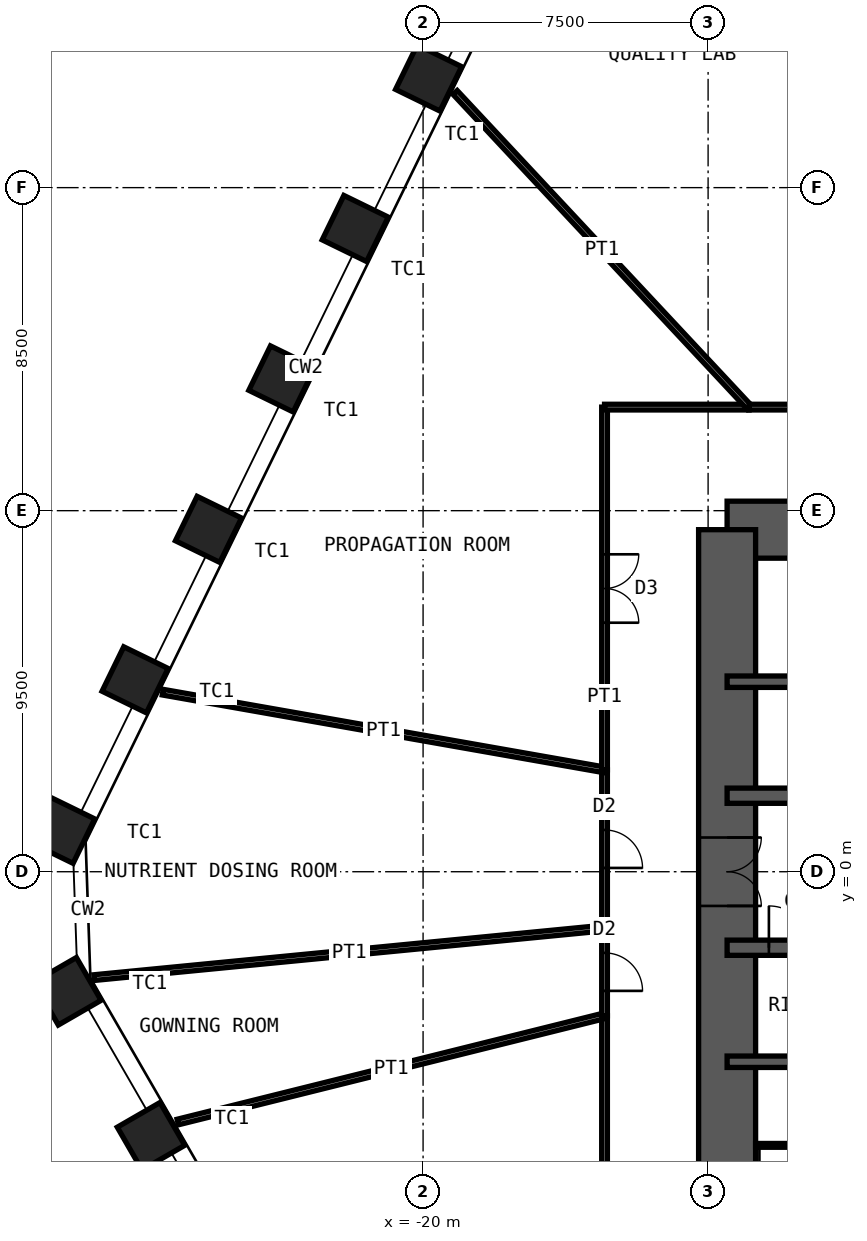
"""IFC4 building model, lengths in metres.
Left out: names, types, materials, properties, quantities, classifications, styles, units other than length and angle.
Written with IfcOpenShell. Run it as: python <this file> out.ifc"""

import sys

from ifc_helpers import new_model, si_unit, direction, frame, frame_2d, origin, origin_2d, place, context, subcontext, project, spatial, rectangle, hollow_rectangle, extrude, element, fill, save


model = new_model("IFC4")
c1 = context("Model", 3, precision=1e-05, world=origin(), true_north=direction((0.0, 1.0)))
c2 = subcontext(c1, "Body", "Model", "MODEL_VIEW")
j1 = project(units=[si_unit("LENGTHUNIT", "METRE"), si_unit("PLANEANGLEUNIT", "RADIAN")], contexts=[c1])
p1 = place(None, origin())
s1 = spatial("IfcSite", under=j1, at=p1, CompositionType="ELEMENT")
p2 = place(p1, origin())
s2 = spatial("IfcBuilding", under=s1, at=p2, CompositionType="ELEMENT")
p3 = place(p2, frame((0.0, 0.0, 32.0)))
s3 = spatial("IfcBuildingStorey", under=s2, at=p3, CompositionType="ELEMENT", Elevation=32.0)
for number, where, z_axis, x_axis in (
    (1, (-27.158, -6.96, 0.0), (0.0, 0.0, 1.0), (0.5, -0.866, 0.0)),
    (2, (-29.361, -3.146, 0.0), (0.0, 0.0, 1.0), (0.5, -0.866, 0.0)),
    (3, (-29.509, 1.09, 0.0), (0.0, 0.0, 1.0), (-0.438, -0.899, 0.0)),
    (4, (-27.578, 5.049, 0.0), (0.0, 0.0, 1.0), (-0.438, -0.899, 0.0)),
    (5, (-25.647, 9.008, 0.0), (0.0, 0.0, 1.0), (-0.438, -0.899, 0.0)),
    (6, (-23.716, 12.966, 0.0), (0.0, 0.0, 1.0), (-0.438, -0.899, 0.0)),
    (7, (-21.785, 16.925, 0.0), (0.0, 0.0, 1.0), (-0.438, -0.899, 0.0)),
    (8, (-19.854, 20.884, 0.0), (0.0, 0.0, 1.0), (-0.438, -0.899, 0.0)),
):
    element("IfcColumn", number, at=place(p3, frame(where, z_axis=z_axis, x_axis=x_axis)), inside=s3, PredefinedType="COLUMN", context=c2, shape_type="SweptSolid", body=[
        extrude(hollow_rectangle(XDim=1.3, YDim=1.3, WallThickness=0.1, at=origin_2d()), origin(), (0.0, 0.0, 1.0), 5.0),
    ])
p4 = place(p3, frame((-12.0, 9.0, 0.0), z_axis=(0.0, 0.0, 1.0), x_axis=(1.0, 0.0, 0.0)))
e9 = element("IfcWall", 9, at=p4, inside=s3, PredefinedType="SHEAR", context=c2, shape_type="SweptSolid", body=[
    extrude(rectangle(XDim=24.0, YDim=1.5, at=frame_2d((12.0, 0.0))), origin(), (0.0, 0.0, 1.0), 5.0),
])
p5 = place(p4, frame((10.4, 0.0, 0.0)))
e10 = element("IfcOpeningElement", 10, at=p5, cuts=e9, PredefinedType="OPENING", context=c2, shape_type="SweptSolid", body=[
    extrude(rectangle(XDim=1.0, YDim=2.1, at=frame_2d((0.5, 1.05))), frame((0.0, 0.76, 0.0), z_axis=(0.0, -1.0, 0.0), x_axis=(1.0, 0.0, 0.0)), (0.0, 0.0, 1.0), 1.52),
])
p6 = place(p4, frame((17.6, 0.0, 0.0)))
e11 = element("IfcOpeningElement", 11, at=p6, cuts=e9, PredefinedType="OPENING", context=c2, shape_type="SweptSolid", body=[
    extrude(rectangle(XDim=0.9, YDim=2.1, at=frame_2d((0.45, 1.05))), frame((0.0, 0.76, 0.0), z_axis=(0.0, -1.0, 0.0), x_axis=(1.0, 0.0, 0.0)), (0.0, 0.0, 1.0), 1.52),
])
p7 = place(p4, frame((21.9, 0.0, 0.0)))
e12 = element("IfcOpeningElement", 12, at=p7, cuts=e9, PredefinedType="OPENING", context=c2, shape_type="SweptSolid", body=[
    extrude(rectangle(XDim=0.9, YDim=2.1, at=frame_2d((0.45, 1.05))), frame((0.0, 0.76, 0.0), z_axis=(0.0, -1.0, 0.0), x_axis=(1.0, 0.0, 0.0)), (0.0, 0.0, 1.0), 1.52),
])
p8 = place(p3, frame((-12.0, -9.0, 0.0), z_axis=(0.0, 0.0, 1.0), x_axis=(0.0, 1.0, 0.0)))
e13 = element("IfcWall", 13, at=p8, inside=s3, PredefinedType="SHEAR", context=c2, shape_type="SweptSolid", body=[
    extrude(rectangle(XDim=18.0, YDim=1.5, at=frame_2d((9.0, 0.0))), origin(), (0.0, 0.0, 1.0), 5.0),
])
p9 = place(p8, frame((8.1, 0.0, 0.0)))
e14 = element("IfcOpeningElement", 14, at=p9, cuts=e13, PredefinedType="OPENING", context=c2, shape_type="SweptSolid", body=[
    extrude(rectangle(XDim=1.8, YDim=2.1, at=frame_2d((0.9, 1.05))), frame((0.0, 0.76, 0.0), z_axis=(0.0, -1.0, 0.0), x_axis=(1.0, 0.0, 0.0)), (0.0, 0.0, 1.0), 1.52),
])
p10 = place(p3, frame((-12.0, 5.0, 0.0), z_axis=(0.0, 0.0, 1.0), x_axis=(1.0, 0.0, 0.0)))
e15 = element("IfcWall", 15, at=p10, inside=s3, PredefinedType="SHEAR", context=c2, shape_type="SweptSolid", body=[
    extrude(rectangle(XDim=24.0, YDim=0.3, at=frame_2d((12.0, 0.0))), origin(), (0.0, 0.0, 1.0), 5.0),
])
p11 = place(p3, frame((-12.0, 2.0, 0.0), z_axis=(0.0, 0.0, 1.0), x_axis=(1.0, 0.0, 0.0)))
e16 = element("IfcWall", 16, at=p11, inside=s3, PredefinedType="SHEAR", context=c2, shape_type="SweptSolid", body=[
    extrude(rectangle(XDim=24.0, YDim=0.4, at=frame_2d((12.0, 0.0))), origin(), (0.0, 0.0, 1.0), 5.0),
])
p12 = place(p11, frame((2.4, 0.0, 0.0)))
e17 = element("IfcOpeningElement", 17, at=p12, cuts=e16, PredefinedType="OPENING", context=c2, shape_type="SweptSolid", body=[
    extrude(rectangle(XDim=1.1, YDim=2.1, at=frame_2d((0.55, 1.05))), frame((0.0, 0.21, 0.0), z_axis=(0.0, -1.0, 0.0), x_axis=(1.0, 0.0, 0.0)), (0.0, 0.0, 1.0), 0.42),
])
p13 = place(p11, frame((22.0, 0.0, 0.0)))
e18 = element("IfcOpeningElement", 18, at=p13, cuts=e16, PredefinedType="OPENING", context=c2, shape_type="SweptSolid", body=[
    extrude(rectangle(XDim=1.1, YDim=2.1, at=frame_2d((0.55, 1.05))), frame((0.0, 0.21, 0.0), z_axis=(0.0, -1.0, 0.0), x_axis=(1.0, 0.0, 0.0)), (0.0, 0.0, 1.0), 0.42),
])
p14 = place(p11, frame((10.15, 0.0, 0.0)))
e19 = element("IfcOpeningElement", 19, at=p14, cuts=e16, PredefinedType="OPENING", context=c2, shape_type="SweptSolid", body=[
    extrude(rectangle(XDim=1.0, YDim=2.1, at=frame_2d((0.5, 1.05))), frame((0.0, 0.21, 0.0), z_axis=(0.0, -1.0, 0.0), x_axis=(1.0, 0.0, 0.0)), (0.0, 0.0, 1.0), 0.42),
])
p15 = place(p11, frame((6.7, 0.0, 0.0)))
e20 = element("IfcOpeningElement", 20, at=p15, cuts=e16, PredefinedType="OPENING", context=c2, shape_type="SweptSolid", body=[
    extrude(rectangle(XDim=1.4, YDim=2.4, at=frame_2d((0.7, 1.2))), frame((0.0, 0.21, 0.0), z_axis=(0.0, -1.0, 0.0), x_axis=(1.0, 0.0, 0.0)), (0.0, 0.0, 1.0), 0.42),
])
p16 = place(p11, frame((13.35, 0.0, 0.0)))
e21 = element("IfcOpeningElement", 21, at=p16, cuts=e16, PredefinedType="OPENING", context=c2, shape_type="SweptSolid", body=[
    extrude(rectangle(XDim=1.1, YDim=2.4, at=frame_2d((0.55, 1.2))), frame((0.0, 0.21, 0.0), z_axis=(0.0, -1.0, 0.0), x_axis=(1.0, 0.0, 0.0)), (0.0, 0.0, 1.0), 0.42),
])
p17 = place(p11, frame((16.15, 0.0, 0.0)))
e22 = element("IfcOpeningElement", 22, at=p17, cuts=e16, PredefinedType="OPENING", context=c2, shape_type="SweptSolid", body=[
    extrude(rectangle(XDim=1.1, YDim=2.4, at=frame_2d((0.55, 1.2))), frame((0.0, 0.21, 0.0), z_axis=(0.0, -1.0, 0.0), x_axis=(1.0, 0.0, 0.0)), (0.0, 0.0, 1.0), 0.42),
])
p18 = place(p11, frame((18.95, 0.0, 0.0)))
e23 = element("IfcOpeningElement", 23, at=p18, cuts=e16, PredefinedType="OPENING", context=c2, shape_type="SweptSolid", body=[
    extrude(rectangle(XDim=1.1, YDim=2.4, at=frame_2d((0.55, 1.2))), frame((0.0, 0.21, 0.0), z_axis=(0.0, -1.0, 0.0), x_axis=(1.0, 0.0, 0.0)), (0.0, 0.0, 1.0), 0.42),
])
p19 = place(p3, frame((-12.0, -2.0, 0.0), z_axis=(0.0, 0.0, 1.0), x_axis=(1.0, 0.0, 0.0)))
e24 = element("IfcWall", 24, at=p19, inside=s3, PredefinedType="SHEAR", context=c2, shape_type="SweptSolid", body=[
    extrude(rectangle(XDim=24.0, YDim=0.4, at=frame_2d((12.0, 0.0))), origin(), (0.0, 0.0, 1.0), 5.0),
])
p20 = place(p19, frame((1.1, 0.0, 0.0)))
e25 = element("IfcOpeningElement", 25, at=p20, cuts=e24, PredefinedType="OPENING", context=c2, shape_type="SweptSolid", body=[
    extrude(rectangle(XDim=1.1, YDim=2.1, at=frame_2d((0.55, 1.05))), frame((0.0, 0.21, 0.0), z_axis=(0.0, -1.0, 0.0), x_axis=(1.0, 0.0, 0.0)), (0.0, 0.0, 1.0), 0.42),
])
p21 = place(p19, frame((13.55, 0.0, 0.0)))
e26 = element("IfcOpeningElement", 26, at=p21, cuts=e24, PredefinedType="OPENING", context=c2, shape_type="SweptSolid", body=[
    extrude(rectangle(XDim=1.1, YDim=2.1, at=frame_2d((0.55, 1.05))), frame((0.0, 0.21, 0.0), z_axis=(0.0, -1.0, 0.0), x_axis=(1.0, 0.0, 0.0)), (0.0, 0.0, 1.0), 0.42),
])
p22 = place(p19, frame((20.7, 0.0, 0.0)))
e27 = element("IfcOpeningElement", 27, at=p22, cuts=e24, PredefinedType="OPENING", context=c2, shape_type="SweptSolid", body=[
    extrude(rectangle(XDim=1.1, YDim=2.1, at=frame_2d((0.55, 1.05))), frame((0.0, 0.21, 0.0), z_axis=(0.0, -1.0, 0.0), x_axis=(1.0, 0.0, 0.0)), (0.0, 0.0, 1.0), 0.42),
])
p23 = place(p3, frame((-12.0, -5.0, 0.0), z_axis=(0.0, 0.0, 1.0), x_axis=(1.0, 0.0, 0.0)))
e28 = element("IfcWall", 28, at=p23, inside=s3, PredefinedType="SHEAR", context=c2, shape_type="SweptSolid", body=[
    extrude(rectangle(XDim=24.0, YDim=0.3, at=frame_2d((12.0, 0.0))), origin(), (0.0, 0.0, 1.0), 5.0),
])
p24 = place(p3, frame((-11.25, -7.2, 0.0), z_axis=(0.0, 0.0, 1.0), x_axis=(1.0, 0.0, 0.0)))
e29 = element("IfcWall", 29, at=p24, inside=s3, PredefinedType="PARTITIONING", context=c2, shape_type="SweptSolid", body=[
    extrude(rectangle(XDim=2.9, YDim=0.1, at=frame_2d((1.45, 0.0))), origin(), (0.0, 0.0, 1.0), 4.78),
])
p25 = place(p24, frame((0.1, 0.0, 0.0)))
e30 = element("IfcOpeningElement", 30, at=p25, cuts=e29, PredefinedType="OPENING", context=c2, shape_type="SweptSolid", body=[
    extrude(rectangle(XDim=1.0, YDim=2.4, at=frame_2d((0.5, 1.2))), frame((0.0, 0.06, 0.0), z_axis=(0.0, -1.0, 0.0), x_axis=(1.0, 0.0, 0.0)), (0.0, 0.0, 1.0), 0.12),
])
p26 = place(p3, frame((-15.225, -12.225, 0.0), z_axis=(0.0, 0.0, 1.0), x_axis=(0.0, 1.0, 0.0)))
e31 = element("IfcWall", 31, at=p26, inside=s3, PredefinedType="PARTITIONING", context=c2, shape_type="SweptSolid", body=[
    extrude(rectangle(XDim=8.435, YDim=0.15, at=frame_2d((4.217, 0.0))), origin(), (0.0, 0.0, 1.0), 4.8),
])
p27 = place(p3, frame((-26.455, -6.586, 0.0), z_axis=(0.0, 0.0, 1.0), x_axis=(0.970383998101, 0.241567581083, 0.0)))
e32 = element("IfcWall", 32, at=p27, inside=s3, PredefinedType="PARTITIONING", context=c2, shape_type="SweptSolid", body=[
    extrude(rectangle(XDim=11.573, YDim=0.15, at=frame_2d((5.787, 0.0))), origin(), (0.0, 0.0, 1.0), 3.7),
])
p28 = place(p3, frame((-15.225, -3.79, 0.0), z_axis=(0.0, 0.0, 1.0), x_axis=(0.0, 1.0, 0.0)))
e33 = element("IfcWall", 33, at=p28, inside=s3, PredefinedType="PARTITIONING", context=c2, shape_type="SweptSolid", body=[
    extrude(rectangle(XDim=2.31, YDim=0.15, at=frame_2d((1.155, 0.0))), origin(), (0.0, 0.0, 1.0), 4.8),
])
p29 = place(p28, frame((0.655, 0.0, 0.0)))
e34 = element("IfcOpeningElement", 34, at=p29, cuts=e33, PredefinedType="OPENING", context=c2, shape_type="SweptSolid", body=[
    extrude(rectangle(XDim=1.0, YDim=2.4, at=frame_2d((0.5, 1.2))), frame((0.0, 0.085, 0.0), z_axis=(0.0, -1.0, 0.0), x_axis=(1.0, 0.0, 0.0)), (0.0, 0.0, 1.0), 0.17),
])
p30 = place(p3, frame((-28.655, -2.786, 0.0), z_axis=(0.0, 0.0, 1.0), x_axis=(0.995307331187, 0.096764231438, 0.0)))
e35 = element("IfcWall", 35, at=p30, inside=s3, PredefinedType="PARTITIONING", context=c2, shape_type="SweptSolid", body=[
    extrude(rectangle(XDim=13.493, YDim=0.15, at=frame_2d((6.747, 0.0))), origin(), (0.0, 0.0, 1.0), 3.7),
])
p31 = place(p3, frame((-15.225, -1.48, 0.0), z_axis=(0.0, 0.0, 1.0), x_axis=(0.0, 1.0, 0.0)))
e36 = element("IfcWall", 36, at=p31, inside=s3, PredefinedType="PARTITIONING", context=c2, shape_type="SweptSolid", body=[
    extrude(rectangle(XDim=4.159, YDim=0.15, at=frame_2d((2.08, 0.0))), origin(), (0.0, 0.0, 1.0), 4.8),
])
p32 = place(p31, frame((1.58, 0.0, 0.0)))
e37 = element("IfcOpeningElement", 37, at=p32, cuts=e36, PredefinedType="OPENING", context=c2, shape_type="SweptSolid", body=[
    extrude(rectangle(XDim=1.0, YDim=2.4, at=frame_2d((0.5, 1.2))), frame((0.0, 0.085, 0.0), z_axis=(0.0, -1.0, 0.0), x_axis=(1.0, 0.0, 0.0)), (0.0, 0.0, 1.0), 0.17),
])
p33 = place(p3, frame((-26.85, 4.725, 0.0), z_axis=(0.0, 0.0, 1.0), x_axis=(0.984867773441, -0.173307440223, 0.0)))
e38 = element("IfcWall", 38, at=p33, inside=s3, PredefinedType="PARTITIONING", context=c2, shape_type="SweptSolid", body=[
    extrude(rectangle(XDim=11.804, YDim=0.15, at=frame_2d((5.902, 0.0))), origin(), (0.0, 0.0, 1.0), 3.7),
])
p34 = place(p3, frame((-15.225, 2.679, 0.0), z_axis=(0.0, 0.0, 1.0), x_axis=(0.0, 1.0, 0.0)))
e39 = element("IfcWall", 39, at=p34, inside=s3, PredefinedType="PARTITIONING", context=c2, shape_type="SweptSolid", body=[
    extrude(rectangle(XDim=9.546, YDim=0.15, at=frame_2d((4.773, 0.0))), origin(), (0.0, 0.0, 1.0), 4.8),
])
p35 = place(p34, frame((3.873, 0.0, 0.0)))
e40 = element("IfcOpeningElement", 40, at=p35, cuts=e39, PredefinedType="OPENING", context=c2, shape_type="SweptSolid", body=[
    extrude(rectangle(XDim=1.8, YDim=2.4, at=frame_2d((0.9, 1.2))), frame((0.0, 0.085, 0.0), z_axis=(0.0, -1.0, 0.0), x_axis=(1.0, 0.0, 0.0)), (0.0, 0.0, 1.0), 0.17),
])
p36 = place(p3, frame((-15.225, 12.225, 0.0), z_axis=(0.0, 0.0, 1.0), x_axis=(1.0, 0.0, 0.0)))
e41 = element("IfcWall", 41, at=p36, inside=s3, PredefinedType="PARTITIONING", context=c2, shape_type="SweptSolid", body=[
    extrude(rectangle(XDim=3.803, YDim=0.15, at=frame_2d((1.902, 0.0))), origin(), (0.0, 0.0, 1.0), 4.8),
])
p37 = place(p3, frame((-19.157, 20.504, 0.0), z_axis=(0.0, 0.0, 1.0), x_axis=(0.682695116082, -0.730703345057, 0.0)))
e42 = element("IfcWall", 42, at=p37, inside=s3, PredefinedType="PARTITIONING", context=c2, shape_type="SweptSolid", body=[
    extrude(rectangle(XDim=11.33, YDim=0.15, at=frame_2d((5.665, 0.0))), origin(), (0.0, 0.0, 1.0), 3.7),
])
p38 = place(p3, frame((-11.422, 12.225, 0.0), z_axis=(0.0, 0.0, 1.0), x_axis=(1.0, 0.0, 0.0)))
e43 = element("IfcWall", 43, at=p38, inside=s3, PredefinedType="PARTITIONING", context=c2, shape_type="SweptSolid", body=[
    extrude(rectangle(XDim=6.742, YDim=0.15, at=frame_2d((3.371, 0.0))), origin(), (0.0, 0.0, 1.0), 4.8),
])
p39 = place(p38, frame((2.871, 0.0, 0.0)))
e44 = element("IfcOpeningElement", 44, at=p39, cuts=e43, PredefinedType="OPENING", context=c2, shape_type="SweptSolid", body=[
    extrude(rectangle(XDim=1.0, YDim=2.4, at=frame_2d((0.5, 1.2))), frame((0.0, 0.085, 0.0), z_axis=(0.0, -1.0, 0.0), x_axis=(1.0, 0.0, 0.0)), (0.0, 0.0, 1.0), 0.17),
])
p40 = place(p20, origin())
e45 = element("IfcDoor", 45, at=p40, inside=s3, OperationType="SINGLE_SWING_RIGHT", PredefinedType="DOOR", context=c2, shape_type="SweptSolid", body=[
    extrude(rectangle(XDim=1.1, YDim=2.1, at=frame_2d((0.55, 1.05))), frame((0.0, 0.025, 0.0), z_axis=(0.0, -1.0, 0.0), x_axis=(1.0, 0.0, 0.0)), (0.0, 0.0, 1.0), 0.05),
])
fill(e25, e45)
p41 = place(p9, origin())
e46 = element("IfcDoor", 46, at=p41, inside=s3, OperationType="DOUBLE_DOOR_DOUBLE_SWING", PredefinedType="DOOR", context=c2, shape_type="SweptSolid", body=[
    extrude(rectangle(XDim=1.8, YDim=2.1, at=frame_2d((0.9, 1.05))), frame((0.0, 0.025, 0.0), z_axis=(0.0, -1.0, 0.0), x_axis=(1.0, 0.0, 0.0)), (0.0, 0.0, 1.0), 0.05),
])
fill(e14, e46)
p42 = place(p25, origin())
e47 = element("IfcDoor", 47, at=p42, inside=s3, OperationType="SINGLE_SWING_LEFT", PredefinedType="DOOR", context=c2, shape_type="SweptSolid", body=[
    extrude(rectangle(XDim=1.0, YDim=2.4, at=frame_2d((0.5, 1.2))), frame((0.0, 0.025, 0.0), z_axis=(0.0, -1.0, 0.0), x_axis=(1.0, 0.0, 0.0)), (0.0, 0.0, 1.0), 0.05),
])
fill(e30, e47)
p43 = place(p29, origin())
e48 = element("IfcDoor", 48, at=p43, inside=s3, OperationType="SINGLE_SWING_LEFT", PredefinedType="DOOR", context=c2, shape_type="SweptSolid", body=[
    extrude(rectangle(XDim=1.0, YDim=2.4, at=frame_2d((0.5, 1.2))), frame((0.0, 0.025, 0.0), z_axis=(0.0, -1.0, 0.0), x_axis=(1.0, 0.0, 0.0)), (0.0, 0.0, 1.0), 0.05),
])
fill(e34, e48)
p44 = place(p32, origin())
e49 = element("IfcDoor", 49, at=p44, inside=s3, OperationType="SINGLE_SWING_LEFT", PredefinedType="DOOR", context=c2, shape_type="SweptSolid", body=[
    extrude(rectangle(XDim=1.0, YDim=2.4, at=frame_2d((0.5, 1.2))), frame((0.0, 0.025, 0.0), z_axis=(0.0, -1.0, 0.0), x_axis=(1.0, 0.0, 0.0)), (0.0, 0.0, 1.0), 0.05),
])
fill(e37, e49)
p45 = place(p35, origin())
e50 = element("IfcDoor", 50, at=p45, inside=s3, OperationType="DOUBLE_DOOR_DOUBLE_SWING", PredefinedType="DOOR", context=c2, shape_type="SweptSolid", body=[
    extrude(rectangle(XDim=1.8, YDim=2.4, at=frame_2d((0.9, 1.2))), frame((0.0, 0.025, 0.0), z_axis=(0.0, -1.0, 0.0), x_axis=(1.0, 0.0, 0.0)), (0.0, 0.0, 1.0), 0.05),
])
fill(e40, e50)
save(model, sys.argv[1])
